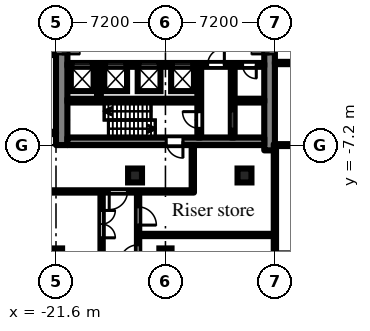
"""IFC4 building model, lengths in metres.
Left out: names, types, materials, properties, quantities, classifications, styles, units other than length and angle.
Written with IfcOpenShell. Run it as: python <this file> out.ifc"""

import sys

from ifc_helpers import new_model, si_unit, direction, frame, frame_2d, origin, origin_2d, place, context, subcontext, project, spatial, rectangle, hollow_circle, extrude, element, fill, save


model = new_model("IFC4")
c1 = context("Model", 3, precision=1e-05, world=origin(), true_north=direction((0.0, 1.0)))
c2 = subcontext(c1, "Body", "Model", "MODEL_VIEW")
j1 = project(units=[si_unit("LENGTHUNIT", "METRE"), si_unit("PLANEANGLEUNIT", "RADIAN")], contexts=[c1])
p1 = place(None, origin())
s1 = spatial("IfcSite", under=j1, at=p1, CompositionType="ELEMENT")
p2 = place(p1, origin())
s2 = spatial("IfcBuilding", under=s1, at=p2, CompositionType="ELEMENT")
p3 = place(p2, origin())
s3 = spatial("IfcBuildingStorey", under=s2, at=p3, CompositionType="ELEMENT", Elevation=0.0)
for number, where, z_axis, x_axis in (
    (1, (-21.6, -14.4, 0.0), (0.0, 0.0, 1.0), (1.0, 0.0, 0.0)),
    (2, (-14.4, -14.4, 0.0), (0.0, 0.0, 1.0), (1.0, 0.0, 0.0)),
):
    element("IfcColumn", number, at=place(p3, frame(where, z_axis=z_axis, x_axis=x_axis)), inside=s3, PredefinedType="COLUMN", context=c2, shape_type="SweptSolid", body=[
        extrude(rectangle(XDim=0.8, YDim=0.8, at=origin_2d()), origin(), (0.0, 0.0, 1.0), 6.6),
    ])
for number, where, z_axis, x_axis in (
    (3, (-16.4, -9.2, 0.0), (0.0, 0.0, 1.0), (1.0, 0.0, 0.0)),
    (4, (-9.2, -9.2, 0.0), (0.0, 0.0, 1.0), (1.0, 0.0, 0.0)),
):
    element("IfcColumn", number, at=place(p3, frame(where, z_axis=z_axis, x_axis=x_axis)), inside=s3, PredefinedType="COLUMN", context=c2, shape_type="SweptSolid", body=[
        extrude(hollow_circle(Radius=0.457, WallThickness=0.05, at=origin_2d()), origin(), (0.0, 0.0, 1.0), 7.5),
    ])
p4 = place(p3, frame((-7.55, -7.548, 0.0), z_axis=(0.0, 0.0, 1.0), x_axis=(0.0, 1.0, 0.0)))
e5 = element("IfcWall", 5, at=p4, inside=s3, PredefinedType="SHEAR", context=c2, shape_type="SweptSolid", body=[
    extrude(rectangle(XDim=15.096, YDim=0.7, at=frame_2d((7.548, 0.0))), origin(), (0.0, 0.0, 1.0), 6.6),
])
p5 = place(p4, frame((6.348, 0.0, 0.0)))
e6 = element("IfcOpeningElement", 6, at=p5, cuts=e5, PredefinedType="OPENING", context=c2, shape_type="SweptSolid", body=[
    extrude(rectangle(XDim=2.4, YDim=2.2, at=frame_2d((1.2, 1.1))), frame((0.0, 0.36, 0.0), z_axis=(0.0, -1.0, 0.0), x_axis=(1.0, 0.0, 0.0)), (0.0, 0.0, 1.0), 0.72),
])
p6 = place(p3, frame((-21.225, -7.2, 0.0), z_axis=(0.0, 0.0, 1.0), x_axis=(0.0, 1.0, 0.0)))
e7 = element("IfcWall", 7, at=p6, inside=s3, PredefinedType="SHEAR", context=c2, shape_type="SweptSolid", body=[
    extrude(rectangle(XDim=14.4, YDim=0.75, at=frame_2d((7.2, 0.0))), origin(), (0.0, 0.0, 1.0), 6.6),
])
p7 = place(p6, frame((6.0, 0.0, 0.0)))
e8 = element("IfcOpeningElement", 8, at=p7, cuts=e7, PredefinedType="OPENING", context=c2, shape_type="SweptSolid", body=[
    extrude(rectangle(XDim=2.4, YDim=2.2, at=frame_2d((1.2, 1.1))), frame((0.0, 0.385, 0.0), z_axis=(0.0, -1.0, 0.0), x_axis=(1.0, 0.0, 0.0)), (0.0, 0.0, 1.0), 0.77),
])
p8 = place(p3, frame((-7.9, -6.95, 0.0), z_axis=(0.0, 0.0, 1.0), x_axis=(-1.0, 0.0, 0.0)))
e9 = element("IfcWall", 9, at=p8, inside=s3, PredefinedType="SHEAR", context=c2, shape_type="SweptSolid", body=[
    extrude(rectangle(XDim=12.95, YDim=0.5, at=frame_2d((6.475, 0.0))), origin(), (0.0, 0.0, 1.0), 6.6),
])
p9 = place(p8, frame((5.35, 0.0, 0.0)))
e10 = element("IfcOpeningElement", 10, at=p9, cuts=e9, PredefinedType="OPENING", context=c2, shape_type="SweptSolid", body=[
    extrude(rectangle(XDim=1.1, YDim=2.1, at=frame_2d((0.55, 1.05))), frame((0.0, 0.26, 0.0), z_axis=(0.0, -1.0, 0.0), x_axis=(1.0, 0.0, 0.0)), (0.0, 0.0, 1.0), 0.52),
])
p10 = place(p3, frame((-7.9, -1.925, 0.0), z_axis=(0.0, 0.0, 1.0), x_axis=(-1.0, 0.0, 0.0)))
e11 = element("IfcWall", 11, at=p10, inside=s3, PredefinedType="SHEAR", context=c2, shape_type="SweptSolid", body=[
    extrude(rectangle(XDim=12.95, YDim=0.25, at=frame_2d((6.475, 0.0))), origin(), (0.0, 0.0, 1.0), 6.6),
])
p11 = place(p10, frame((4.825, 0.0, 0.0)))
e12 = element("IfcOpeningElement", 12, at=p11, cuts=e11, PredefinedType="OPENING", context=c2, shape_type="SweptSolid", body=[
    extrude(rectangle(XDim=1.1, YDim=2.1, at=frame_2d((0.55, 1.05))), frame((0.0, 0.135, 0.0), z_axis=(0.0, -1.0, 0.0), x_axis=(1.0, 0.0, 0.0)), (0.0, 0.0, 1.0), 0.27),
])
p12 = place(p10, frame((7.025, 0.0, 0.0)))
e13 = element("IfcOpeningElement", 13, at=p12, cuts=e11, PredefinedType="OPENING", context=c2, shape_type="SweptSolid", body=[
    extrude(rectangle(XDim=1.1, YDim=2.1, at=frame_2d((0.55, 1.05))), frame((0.0, 0.135, 0.0), z_axis=(0.0, -1.0, 0.0), x_axis=(1.0, 0.0, 0.0)), (0.0, 0.0, 1.0), 0.27),
])
p13 = place(p10, frame((9.225, 0.0, 0.0)))
e14 = element("IfcOpeningElement", 14, at=p13, cuts=e11, PredefinedType="OPENING", context=c2, shape_type="SweptSolid", body=[
    extrude(rectangle(XDim=1.1, YDim=2.1, at=frame_2d((0.55, 1.05))), frame((0.0, 0.135, 0.0), z_axis=(0.0, -1.0, 0.0), x_axis=(1.0, 0.0, 0.0)), (0.0, 0.0, 1.0), 0.27),
])
p14 = place(p10, frame((11.425, 0.0, 0.0)))
e15 = element("IfcOpeningElement", 15, at=p14, cuts=e11, PredefinedType="OPENING", context=c2, shape_type="SweptSolid", body=[
    extrude(rectangle(XDim=1.1, YDim=2.1, at=frame_2d((0.55, 1.05))), frame((0.0, 0.135, 0.0), z_axis=(0.0, -1.0, 0.0), x_axis=(1.0, 0.0, 0.0)), (0.0, 0.0, 1.0), 0.27),
])
p15 = place(p10, frame((0.525, 0.0, 0.0)))
e16 = element("IfcOpeningElement", 16, at=p15, cuts=e11, PredefinedType="OPENING", context=c2, shape_type="SweptSolid", body=[
    extrude(rectangle(XDim=0.9, YDim=2.1, at=frame_2d((0.45, 1.05))), frame((0.0, 0.135, 0.0), z_axis=(0.0, -1.0, 0.0), x_axis=(1.0, 0.0, 0.0)), (0.0, 0.0, 1.0), 0.27),
])
p16 = place(p10, frame((2.625, 0.0, 0.0)))
e17 = element("IfcOpeningElement", 17, at=p16, cuts=e11, PredefinedType="OPENING", context=c2, shape_type="SweptSolid", body=[
    extrude(rectangle(XDim=1.1, YDim=2.1, at=frame_2d((0.55, 1.05))), frame((0.0, 0.135, 0.0), z_axis=(0.0, -1.0, 0.0), x_axis=(1.0, 0.0, 0.0)), (0.0, 0.0, 1.0), 0.27),
])
p17 = place(p3, frame((-7.9, -4.275, 0.0), z_axis=(0.0, 0.0, 1.0), x_axis=(-1.0, 0.0, 0.0)))
e18 = element("IfcWall", 18, at=p17, inside=s3, PredefinedType="SHEAR", context=c2, shape_type="SweptSolid", body=[
    extrude(rectangle(XDim=1.95, YDim=0.25, at=frame_2d((0.975, 0.0))), origin(), (0.0, 0.0, 1.0), 6.6),
])
p18 = place(p3, frame((-12.3, -4.275, 0.0), z_axis=(0.0, 0.0, 1.0), x_axis=(-1.0, 0.0, 0.0)))
e19 = element("IfcWall", 19, at=p18, inside=s3, PredefinedType="SHEAR", context=c2, shape_type="SweptSolid", body=[
    extrude(rectangle(XDim=8.55, YDim=0.25, at=frame_2d((4.275, 0.0))), origin(), (0.0, 0.0, 1.0), 6.6),
])
p19 = place(p3, frame((-9.975, -2.05, 0.0), z_axis=(0.0, 0.0, 1.0), x_axis=(0.0, -1.0, 0.0)))
e20 = element("IfcWall", 20, at=p19, inside=s3, PredefinedType="SHEAR", context=c2, shape_type="SweptSolid", body=[
    extrude(rectangle(XDim=4.65, YDim=0.25, at=frame_2d((2.325, 0.0))), origin(), (0.0, 0.0, 1.0), 6.6),
])
p20 = place(p19, frame((2.95, 0.0, 0.0)))
e21 = element("IfcOpeningElement", 21, at=p20, cuts=e20, PredefinedType="OPENING", context=c2, shape_type="SweptSolid", body=[
    extrude(rectangle(XDim=1.1, YDim=2.1, at=frame_2d((0.55, 1.05))), frame((0.0, 0.135, 0.0), z_axis=(0.0, -1.0, 0.0), x_axis=(1.0, 0.0, 0.0)), (0.0, 0.0, 1.0), 0.27),
])
p21 = place(p3, frame((-12.175, -2.05, 0.0), z_axis=(0.0, 0.0, 1.0), x_axis=(0.0, -1.0, 0.0)))
e22 = element("IfcWall", 22, at=p21, inside=s3, PredefinedType="SHEAR", context=c2, shape_type="SweptSolid", body=[
    extrude(rectangle(XDim=4.65, YDim=0.25, at=frame_2d((2.325, 0.0))), origin(), (0.0, 0.0, 1.0), 6.6),
])
p22 = place(p21, frame((2.95, 0.0, 0.0)))
e23 = element("IfcOpeningElement", 23, at=p22, cuts=e22, PredefinedType="OPENING", context=c2, shape_type="SweptSolid", body=[
    extrude(rectangle(XDim=1.1, YDim=2.1, at=frame_2d((0.55, 1.05))), frame((0.0, 0.135, 0.0), z_axis=(0.0, -1.0, 0.0), x_axis=(1.0, 0.0, 0.0)), (0.0, 0.0, 1.0), 0.27),
])
p23 = place(p3, frame((-18.775, -2.05, 0.0), z_axis=(0.0, 0.0, 1.0), x_axis=(0.0, -1.0, 0.0)))
e24 = element("IfcWall", 24, at=p23, inside=s3, PredefinedType="PARTITIONING", context=c2, shape_type="SweptSolid", body=[
    extrude(rectangle(XDim=2.1, YDim=0.25, at=frame_2d((1.05, 0.0))), origin(), (0.0, 0.0, 1.0), 6.6),
])
p24 = place(p3, frame((-50.22, -10.25, 0.0), z_axis=(0.0, 0.0, 1.0), x_axis=(1.0, 0.0, 0.0)))
e25 = element("IfcWall", 25, at=p24, inside=s3, PredefinedType="PARTITIONING", context=c2, shape_type="SweptSolid", body=[
    extrude(rectangle(XDim=37.695, YDim=0.15, at=frame_2d((18.848, 0.0))), origin(), (0.0, 0.0, 1.0), 6.6),
])
p25 = place(p24, frame((16.82, 0.0, 0.0)))
e26 = element("IfcOpeningElement", 26, at=p25, cuts=e25, PredefinedType="OPENING", context=c2, shape_type="SweptSolid", body=[
    extrude(rectangle(XDim=2.0, YDim=2.1, at=frame_2d((1.0, 1.05))), frame((0.0, 0.085, 0.0), z_axis=(0.0, -1.0, 0.0), x_axis=(1.0, 0.0, 0.0)), (0.0, 0.0, 1.0), 0.17),
])
p26 = place(p24, frame((32.12, 0.0, 0.0)))
e27 = element("IfcOpeningElement", 27, at=p26, cuts=e25, PredefinedType="OPENING", context=c2, shape_type="SweptSolid", body=[
    extrude(rectangle(XDim=1.2, YDim=2.1, at=frame_2d((0.6, 1.05))), frame((0.0, 0.085, 0.0), z_axis=(0.0, -1.0, 0.0), x_axis=(1.0, 0.0, 0.0)), (0.0, 0.0, 1.0), 0.17),
])
p27 = place(p3, frame((-50.22, -6.4, 0.0), z_axis=(0.0, 0.0, 1.0), x_axis=(1.0, 0.0, 0.0)))
e28 = element("IfcWall", 28, at=p27, inside=s3, PredefinedType="PARTITIONING", context=c2, shape_type="SweptSolid", body=[
    extrude(rectangle(XDim=28.62, YDim=0.15, at=frame_2d((14.31, 0.0))), origin(), (0.0, 0.0, 1.0), 6.6),
])
p28 = place(p27, frame((16.82, 0.0, 0.0)))
e29 = element("IfcOpeningElement", 29, at=p28, cuts=e28, PredefinedType="OPENING", context=c2, shape_type="SweptSolid", body=[
    extrude(rectangle(XDim=2.0, YDim=2.1, at=frame_2d((1.0, 1.05))), frame((0.0, 0.085, 0.0), z_axis=(0.0, -1.0, 0.0), x_axis=(1.0, 0.0, 0.0)), (0.0, 0.0, 1.0), 0.17),
])
p29 = place(p3, frame((-31.125, -1.2, 0.0), z_axis=(0.0, 0.0, 1.0), x_axis=(1.0, 0.0, 0.0)))
e30 = element("IfcWall", 30, at=p29, inside=s3, PredefinedType="PARTITIONING", context=c2, shape_type="SweptSolid", body=[
    extrude(rectangle(XDim=9.525, YDim=0.15, at=frame_2d((4.762, 0.0))), origin(), (0.0, 0.0, 1.0), 6.6),
])
p30 = place(p3, frame((-18.6, -16.725, 0.0), z_axis=(0.0, 0.0, 1.0), x_axis=(0.0, 1.0, 0.0)))
e31 = element("IfcWall", 31, at=p30, inside=s3, PredefinedType="PARTITIONING", context=c2, shape_type="SweptSolid", body=[
    extrude(rectangle(XDim=6.4, YDim=0.15, at=frame_2d((3.2, 0.0))), origin(), (0.0, 0.0, 1.0), 6.6),
])
p31 = place(p30, frame((3.425, 0.0, 0.0)))
e32 = element("IfcOpeningElement", 32, at=p31, cuts=e31, PredefinedType="OPENING", context=c2, shape_type="SweptSolid", body=[
    extrude(rectangle(XDim=1.8, YDim=2.1, at=frame_2d((0.9, 1.05))), frame((0.0, 0.085, 0.0), z_axis=(0.0, -1.0, 0.0), x_axis=(1.0, 0.0, 0.0)), (0.0, 0.0, 1.0), 0.17),
])
p32 = place(p3, frame((-16.2, -16.875, 0.0), z_axis=(0.0, 0.0, 1.0), x_axis=(0.0, 1.0, 0.0)))
e33 = element("IfcWall", 33, at=p32, inside=s3, PredefinedType="PARTITIONING", context=c2, shape_type="SweptSolid", body=[
    extrude(rectangle(XDim=6.55, YDim=0.15, at=frame_2d((3.275, 0.0))), origin(), (0.0, 0.0, 1.0), 6.6),
])
p33 = place(p32, frame((1.911, 0.0, 0.0)))
e34 = element("IfcOpeningElement", 34, at=p33, cuts=e33, PredefinedType="OPENING", context=c2, shape_type="SweptSolid", body=[
    extrude(rectangle(XDim=1.2, YDim=2.1, at=frame_2d((0.6, 1.05))), frame((0.0, 0.085, 0.0), z_axis=(0.0, -1.0, 0.0), x_axis=(1.0, 0.0, 0.0)), (0.0, 0.0, 1.0), 0.17),
])
p34 = place(p32, frame((4.411, 0.0, 0.0)))
e35 = element("IfcOpeningElement", 35, at=p34, cuts=e33, PredefinedType="OPENING", context=c2, shape_type="SweptSolid", body=[
    extrude(rectangle(XDim=1.2, YDim=2.1, at=frame_2d((0.6, 1.05))), frame((0.0, 0.085, 0.0), z_axis=(0.0, -1.0, 0.0), x_axis=(1.0, 0.0, 0.0)), (0.0, 0.0, 1.0), 0.17),
])
p35 = place(p3, frame((-16.125, -13.114, 0.0), z_axis=(0.0, 0.0, 1.0), x_axis=(1.0, 0.0, 0.0)))
e36 = element("IfcWall", 36, at=p35, inside=s3, PredefinedType="PARTITIONING", context=c2, shape_type="SweptSolid", body=[
    extrude(rectangle(XDim=8.85, YDim=0.15, at=frame_2d((4.425, 0.0))), origin(), (0.0, 0.0, 1.0), 6.6),
])
p36 = place(p3, frame((-12.6, -10.175, 0.0), z_axis=(0.0, 0.0, 1.0), x_axis=(0.0, 1.0, 0.0)))
e37 = element("IfcWall", 37, at=p36, inside=s3, PredefinedType="PARTITIONING", context=c2, shape_type="SweptSolid", body=[
    extrude(rectangle(XDim=2.975, YDim=0.15, at=frame_2d((1.488, 0.0))), origin(), (0.0, 0.0, 1.0), 6.6),
])
p37 = place(p3, frame((-7.2, -31.125, 0.0), z_axis=(0.0, 0.0, 1.0), x_axis=(0.0, 1.0, 0.0)))
e38 = element("IfcWall", 38, at=p37, inside=s3, PredefinedType="PARTITIONING", context=c2, shape_type="SweptSolid", body=[
    extrude(rectangle(XDim=23.988, YDim=0.15, at=frame_2d((11.994, 0.0))), origin(), (0.0, 0.0, 1.0), 6.3),
])
p38 = place(p37, frame((12.025, 0.0, 0.0)))
e39 = element("IfcOpeningElement", 39, at=p38, cuts=e38, PredefinedType="OPENING", context=c2, shape_type="SweptSolid", body=[
    extrude(rectangle(XDim=1.0, YDim=2.1, at=frame_2d((0.5, 1.05))), frame((0.0, 0.085, 0.0), z_axis=(0.0, -1.0, 0.0), x_axis=(1.0, 0.0, 0.0)), (0.0, 0.0, 1.0), 0.17),
])
p39 = place(p37, frame((6.767, 0.0, 0.0)))
e40 = element("IfcOpeningElement", 40, at=p39, cuts=e38, PredefinedType="OPENING", context=c2, shape_type="SweptSolid", body=[
    extrude(rectangle(XDim=1.8, YDim=2.1, at=frame_2d((0.9, 1.05))), frame((0.0, 0.085, 0.0), z_axis=(0.0, -1.0, 0.0), x_axis=(1.0, 0.0, 0.0)), (0.0, 0.0, 1.0), 0.17),
])
p40 = place(p3, frame((-7.125, -7.2, 0.0), z_axis=(0.0, 0.0, 1.0), x_axis=(1.0, 0.0, 0.0)))
e41 = element("IfcWall", 41, at=p40, inside=s3, PredefinedType="PARTITIONING", context=c2, shape_type="SweptSolid", body=[
    extrude(rectangle(XDim=5.325, YDim=0.125, at=frame_2d((2.663, 0.0))), origin(), (0.0, 0.0, 1.0), 6.6),
])
p41 = place(p3, frame((-7.2, -1.8, 0.0), z_axis=(0.0, 0.0, 1.0), x_axis=(1.0, 0.0, 0.0)))
e42 = element("IfcWall", 42, at=p41, inside=s3, PredefinedType="PARTITIONING", context=c2, shape_type="SweptSolid", body=[
    extrude(rectangle(XDim=5.475, YDim=0.15, at=frame_2d((2.737, 0.0))), origin(), (0.0, 0.0, 1.0), 6.6),
])
p42 = place(p11, origin())
e43 = element("IfcDoor", 43, at=p42, inside=s3, OperationType="SLIDING_TO_LEFT", PredefinedType="DOOR", context=c2, shape_type="SweptSolid", body=[
    extrude(rectangle(XDim=1.1, YDim=2.1, at=frame_2d((0.55, 1.05))), frame((0.0, 0.025, 0.0), z_axis=(0.0, -1.0, 0.0), x_axis=(1.0, 0.0, 0.0)), (0.0, 0.0, 1.0), 0.05),
])
fill(e12, e43)
p43 = place(p12, origin())
e44 = element("IfcDoor", 44, at=p43, inside=s3, OperationType="SLIDING_TO_LEFT", PredefinedType="DOOR", context=c2, shape_type="SweptSolid", body=[
    extrude(rectangle(XDim=1.1, YDim=2.1, at=frame_2d((0.55, 1.05))), frame((0.0, 0.025, 0.0), z_axis=(0.0, -1.0, 0.0), x_axis=(1.0, 0.0, 0.0)), (0.0, 0.0, 1.0), 0.05),
])
fill(e13, e44)
p44 = place(p13, origin())
e45 = element("IfcDoor", 45, at=p44, inside=s3, OperationType="SLIDING_TO_LEFT", PredefinedType="DOOR", context=c2, shape_type="SweptSolid", body=[
    extrude(rectangle(XDim=1.1, YDim=2.1, at=frame_2d((0.55, 1.05))), frame((0.0, 0.025, 0.0), z_axis=(0.0, -1.0, 0.0), x_axis=(1.0, 0.0, 0.0)), (0.0, 0.0, 1.0), 0.05),
])
fill(e14, e45)
p45 = place(p14, origin())
e46 = element("IfcDoor", 46, at=p45, inside=s3, OperationType="SLIDING_TO_LEFT", PredefinedType="DOOR", context=c2, shape_type="SweptSolid", body=[
    extrude(rectangle(XDim=1.1, YDim=2.1, at=frame_2d((0.55, 1.05))), frame((0.0, 0.025, 0.0), z_axis=(0.0, -1.0, 0.0), x_axis=(1.0, 0.0, 0.0)), (0.0, 0.0, 1.0), 0.05),
])
fill(e15, e46)
p46 = place(p20, origin())
e47 = element("IfcDoor", 47, at=p46, inside=s3, OperationType="SLIDING_TO_LEFT", PredefinedType="DOOR", context=c2, shape_type="SweptSolid", body=[
    extrude(rectangle(XDim=1.1, YDim=2.1, at=frame_2d((0.55, 1.05))), frame((0.0, 0.025, 0.0), z_axis=(0.0, -1.0, 0.0), x_axis=(1.0, 0.0, 0.0)), (0.0, 0.0, 1.0), 0.05),
])
fill(e21, e47)
p47 = place(p22, frame((1.1, 0.0, 0.0), z_axis=(0.0, 0.0, 1.0), x_axis=(-1.0, 0.0, 0.0)))
e48 = element("IfcDoor", 48, at=p47, inside=s3, OperationType="SINGLE_SWING_RIGHT", PredefinedType="DOOR", context=c2, shape_type="SweptSolid", body=[
    extrude(rectangle(XDim=1.1, YDim=2.1, at=frame_2d((0.55, 1.05))), frame((0.0, 0.025, 0.0), z_axis=(0.0, -1.0, 0.0), x_axis=(1.0, 0.0, 0.0)), (0.0, 0.0, 1.0), 0.05),
])
fill(e23, e48)
p48 = place(p15, origin())
e49 = element("IfcDoor", 49, at=p48, inside=s3, OperationType="SINGLE_SWING_LEFT", PredefinedType="DOOR", context=c2, shape_type="SweptSolid", body=[
    extrude(rectangle(XDim=0.9, YDim=2.1, at=frame_2d((0.45, 1.05))), frame((0.0, 0.025, 0.0), z_axis=(0.0, -1.0, 0.0), x_axis=(1.0, 0.0, 0.0)), (0.0, 0.0, 1.0), 0.05),
])
fill(e16, e49)
p49 = place(p16, frame((1.1, 0.0, 0.0), z_axis=(0.0, 0.0, 1.0), x_axis=(-1.0, 0.0, 0.0)))
e50 = element("IfcDoor", 50, at=p49, inside=s3, OperationType="SINGLE_SWING_RIGHT", PredefinedType="DOOR", context=c2, shape_type="SweptSolid", body=[
    extrude(rectangle(XDim=1.1, YDim=2.1, at=frame_2d((0.55, 1.05))), frame((0.0, 0.025, 0.0), z_axis=(0.0, -1.0, 0.0), x_axis=(1.0, 0.0, 0.0)), (0.0, 0.0, 1.0), 0.05),
])
fill(e17, e50)
p50 = place(p5, origin())
e51 = element("IfcDoor", 51, at=p50, inside=s3, OperationType="DOUBLE_DOOR_DOUBLE_SWING", PredefinedType="DOOR", context=c2, shape_type="SweptSolid", body=[
    extrude(rectangle(XDim=2.4, YDim=2.2, at=frame_2d((1.2, 1.1))), frame((0.0, 0.025, 0.0), z_axis=(0.0, -1.0, 0.0), x_axis=(1.0, 0.0, 0.0)), (0.0, 0.0, 1.0), 0.05),
])
fill(e6, e51)
p51 = place(p7, frame((2.4, 0.0, 0.0), z_axis=(0.0, 0.0, 1.0), x_axis=(-1.0, 0.0, 0.0)))
e52 = element("IfcDoor", 52, at=p51, inside=s3, OperationType="DOUBLE_DOOR_DOUBLE_SWING", PredefinedType="DOOR", context=c2, shape_type="SweptSolid", body=[
    extrude(rectangle(XDim=2.4, YDim=2.2, at=frame_2d((1.2, 1.1))), frame((0.0, 0.025, 0.0), z_axis=(0.0, -1.0, 0.0), x_axis=(1.0, 0.0, 0.0)), (0.0, 0.0, 1.0), 0.05),
])
fill(e8, e52)
p52 = place(p9, origin())
e53 = element("IfcDoor", 53, at=p52, inside=s3, OperationType="SINGLE_SWING_LEFT", PredefinedType="DOOR", context=c2, shape_type="SweptSolid", body=[
    extrude(rectangle(XDim=1.1, YDim=2.1, at=frame_2d((0.55, 1.05))), frame((0.0, 0.025, 0.0), z_axis=(0.0, -1.0, 0.0), x_axis=(1.0, 0.0, 0.0)), (0.0, 0.0, 1.0), 0.05),
])
fill(e10, e53)
p53 = place(p26, frame((1.2, 0.0, 0.0), z_axis=(0.0, 0.0, 1.0), x_axis=(-1.0, 0.0, 0.0)))
e54 = element("IfcDoor", 54, at=p53, inside=s3, OperationType="SINGLE_SWING_RIGHT", PredefinedType="DOOR", context=c2, shape_type="SweptSolid", body=[
    extrude(rectangle(XDim=1.2, YDim=2.1, at=frame_2d((0.6, 1.05))), frame((0.0, 0.025, 0.0), z_axis=(0.0, -1.0, 0.0), x_axis=(1.0, 0.0, 0.0)), (0.0, 0.0, 1.0), 0.05),
])
fill(e27, e54)
p54 = place(p33, origin())
e55 = element("IfcDoor", 55, at=p54, inside=s3, OperationType="SINGLE_SWING_LEFT", PredefinedType="DOOR", context=c2, shape_type="SweptSolid", body=[
    extrude(rectangle(XDim=1.2, YDim=2.1, at=frame_2d((0.6, 1.05))), frame((0.0, 0.025, 0.0), z_axis=(0.0, -1.0, 0.0), x_axis=(1.0, 0.0, 0.0)), (0.0, 0.0, 1.0), 0.05),
])
fill(e34, e55)
p55 = place(p34, frame((1.2, 0.0, 0.0), z_axis=(0.0, 0.0, 1.0), x_axis=(-1.0, 0.0, 0.0)))
e56 = element("IfcDoor", 56, at=p55, inside=s3, OperationType="SINGLE_SWING_RIGHT", PredefinedType="DOOR", context=c2, shape_type="SweptSolid", body=[
    extrude(rectangle(XDim=1.2, YDim=2.1, at=frame_2d((0.6, 1.05))), frame((0.0, 0.025, 0.0), z_axis=(0.0, -1.0, 0.0), x_axis=(1.0, 0.0, 0.0)), (0.0, 0.0, 1.0), 0.05),
])
fill(e35, e56)
p56 = place(p31, frame((1.8, 0.0, 0.0), z_axis=(0.0, 0.0, 1.0), x_axis=(-1.0, 0.0, 0.0)))
e57 = element("IfcDoor", 57, at=p56, inside=s3, OperationType="DOUBLE_DOOR_DOUBLE_SWING", PredefinedType="DOOR", context=c2, shape_type="SweptSolid", body=[
    extrude(rectangle(XDim=1.8, YDim=2.1, at=frame_2d((0.9, 1.05))), frame((0.0, 0.025, 0.0), z_axis=(0.0, -1.0, 0.0), x_axis=(1.0, 0.0, 0.0)), (0.0, 0.0, 1.0), 0.05),
])
fill(e32, e57)
save(model, sys.argv[1])
